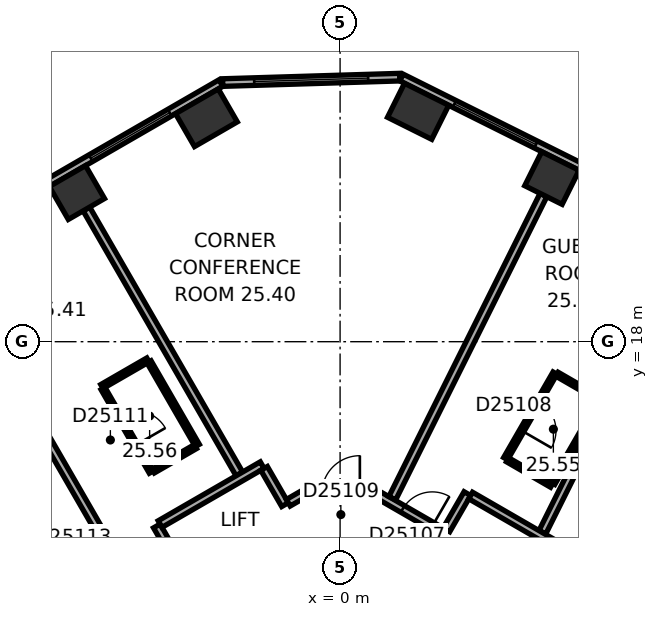
"""IFC4 building model, lengths in metres.
Left out: names, types, materials, properties, quantities, classifications, styles, units other than length and angle.
Written with IfcOpenShell. Run it as: python <this file> out.ifc"""

import sys

from ifc_helpers import new_model, si_unit, direction, frame, frame_2d, origin, origin_2d, place, context, subcontext, project, spatial, rectangle, extrude, element, fill, save


model = new_model("IFC4")
c1 = context("Model", 3, precision=1e-05, world=origin(), true_north=direction((0.0, 1.0)))
c2 = subcontext(c1, "Body", "Model", "MODEL_VIEW")
j1 = project(units=[si_unit("LENGTHUNIT", "METRE"), si_unit("PLANEANGLEUNIT", "RADIAN")], contexts=[c1])
p1 = place(None, origin())
s1 = spatial("IfcSite", under=j1, at=p1, CompositionType="ELEMENT")
p2 = place(p1, origin())
s2 = spatial("IfcBuilding", under=s1, at=p2, CompositionType="ELEMENT")
p3 = place(p2, frame((0.0, 0.0, 106.7)))
s3 = spatial("IfcBuildingStorey", under=s2, at=p3, CompositionType="ELEMENT", Elevation=106.7)
p4 = place(p3, frame((5.574, 22.306, 0.0), z_axis=(0.0, 0.0, 1.0), x_axis=(-0.894934361602, 0.44619781311, 0.0)))
e1 = element("IfcColumn", 1, at=p4, inside=s3, PredefinedType="COLUMN", context=c2, shape_type="SweptSolid", body=[
    extrude(rectangle(XDim=1.1, YDim=1.0, at=origin_2d()), origin(), (0.0, 0.0, 1.0), 3.3),
])
for number, where, z_axis, x_axis in (
    (2, (2.053, 24.062, 0.0), (0.0, 0.0, 1.0), (-0.895, 0.446, 0.0)),
    (3, (-3.518, 23.892, 0.0), (0.0, 0.0, 1.0), (-0.866, -0.5, 0.0)),
):
    element("IfcColumn", number, at=place(p3, frame(where, z_axis=z_axis, x_axis=x_axis)), inside=s3, PredefinedType="COLUMN", context=c2, shape_type="SweptSolid", body=[
        extrude(rectangle(XDim=1.3, YDim=1.0, at=origin_2d()), origin(), (0.0, 0.0, 1.0), 3.3),
    ])
p5 = place(p3, frame((-6.926, 21.925, 0.0), z_axis=(0.0, 0.0, 1.0), x_axis=(-0.866025403784, -0.5, 0.0)))
e4 = element("IfcColumn", 4, at=p5, inside=s3, PredefinedType="COLUMN", context=c2, shape_type="SweptSolid", body=[
    extrude(rectangle(XDim=1.1, YDim=1.0, at=origin_2d()), origin(), (0.0, 0.0, 1.0), 3.3),
])
p6 = place(p3, frame((20.63, 15.47, 0.0), z_axis=(0.0, 0.0, 1.0), x_axis=(-0.894934518609, 0.446197498203, 0.0)))
e5 = element("IfcWall", 5, at=p6, inside=s3, PredefinedType="STANDARD", context=c2, shape_type="SweptSolid", body=[
    extrude(rectangle(XDim=21.246, YDim=0.2, at=frame_2d((10.623, 0.0))), origin(), (0.0, 0.0, 1.0), 3.3),
])
p7 = place(p6, frame((1.553, 0.0, 0.8)))
e6 = element("IfcOpeningElement", 6, at=p7, cuts=e5, PredefinedType="OPENING", context=c2, shape_type="SweptSolid", body=[
    extrude(rectangle(XDim=2.4, YDim=1.7, at=frame_2d((1.2, 0.85))), frame((0.0, 0.11, 0.0), z_axis=(0.0, -1.0, 0.0), x_axis=(1.0, 0.0, 0.0)), (0.0, 0.0, 1.0), 0.22),
])
p8 = place(p6, frame((5.488, 0.0, 0.8)))
e7 = element("IfcOpeningElement", 7, at=p8, cuts=e5, PredefinedType="OPENING", context=c2, shape_type="SweptSolid", body=[
    extrude(rectangle(XDim=2.4, YDim=1.7, at=frame_2d((1.2, 0.85))), frame((0.0, 0.11, 0.0), z_axis=(0.0, -1.0, 0.0), x_axis=(1.0, 0.0, 0.0)), (0.0, 0.0, 1.0), 0.22),
])
p9 = place(p6, frame((9.422, 0.0, 0.8)))
e8 = element("IfcOpeningElement", 8, at=p9, cuts=e5, PredefinedType="OPENING", context=c2, shape_type="SweptSolid", body=[
    extrude(rectangle(XDim=2.4, YDim=1.7, at=frame_2d((1.2, 0.85))), frame((0.0, 0.11, 0.0), z_axis=(0.0, -1.0, 0.0), x_axis=(1.0, 0.0, 0.0)), (0.0, 0.0, 1.0), 0.22),
])
p10 = place(p6, frame((13.357, 0.0, 0.8)))
e9 = element("IfcOpeningElement", 9, at=p10, cuts=e5, PredefinedType="OPENING", context=c2, shape_type="SweptSolid", body=[
    extrude(rectangle(XDim=2.4, YDim=1.7, at=frame_2d((1.2, 0.85))), frame((0.0, 0.11, 0.0), z_axis=(0.0, -1.0, 0.0), x_axis=(1.0, 0.0, 0.0)), (0.0, 0.0, 1.0), 0.22),
])
p11 = place(p6, frame((17.292, 0.0, 0.8)))
e10 = element("IfcOpeningElement", 10, at=p11, cuts=e5, PredefinedType="OPENING", context=c2, shape_type="SweptSolid", body=[
    extrude(rectangle(XDim=2.4, YDim=1.7, at=frame_2d((1.2, 0.85))), frame((0.0, 0.11, 0.0), z_axis=(0.0, -1.0, 0.0), x_axis=(1.0, 0.0, 0.0)), (0.0, 0.0, 1.0), 0.22),
])
p12 = place(p3, frame((1.568, 24.961, 0.0), z_axis=(0.0, 0.0, 1.0), x_axis=(-0.999533359013, -0.030546099927, 0.0)))
e11 = element("IfcWall", 11, at=p12, inside=s3, PredefinedType="STANDARD", context=c2, shape_type="SweptSolid", body=[
    extrude(rectangle(XDim=4.66, YDim=0.2, at=frame_2d((2.33, 0.0))), origin(), (0.0, 0.0, 1.0), 3.3),
])
p13 = place(p12, frame((0.83, 0.0, 0.8)))
e12 = element("IfcOpeningElement", 12, at=p13, cuts=e11, PredefinedType="OPENING", context=c2, shape_type="SweptSolid", body=[
    extrude(rectangle(XDim=3.0, YDim=1.7, at=frame_2d((1.5, 0.85))), frame((0.0, 0.11, 0.0), z_axis=(0.0, -1.0, 0.0), x_axis=(1.0, 0.0, 0.0)), (0.0, 0.0, 1.0), 0.22),
])
p14 = place(p3, frame((-3.136, 24.805, 0.0), z_axis=(0.0, 0.0, 1.0), x_axis=(-0.866028291626, -0.499994998079, 0.0)))
e13 = element("IfcWall", 13, at=p14, inside=s3, PredefinedType="STANDARD", context=c2, shape_type="SweptSolid", body=[
    extrude(rectangle(XDim=21.246, YDim=0.2, at=frame_2d((10.623, 0.0))), origin(), (0.0, 0.0, 1.0), 3.3),
])
p15 = place(p14, frame((1.555, 0.0, 0.8)))
e14 = element("IfcOpeningElement", 14, at=p15, cuts=e13, PredefinedType="OPENING", context=c2, shape_type="SweptSolid", body=[
    extrude(rectangle(XDim=2.4, YDim=1.7, at=frame_2d((1.2, 0.85))), frame((0.0, 0.11, 0.0), z_axis=(0.0, -1.0, 0.0), x_axis=(1.0, 0.0, 0.0)), (0.0, 0.0, 1.0), 0.22),
])
p16 = place(p14, frame((5.489, 0.0, 0.8)))
e15 = element("IfcOpeningElement", 15, at=p16, cuts=e13, PredefinedType="OPENING", context=c2, shape_type="SweptSolid", body=[
    extrude(rectangle(XDim=2.4, YDim=1.7, at=frame_2d((1.2, 0.85))), frame((0.0, 0.11, 0.0), z_axis=(0.0, -1.0, 0.0), x_axis=(1.0, 0.0, 0.0)), (0.0, 0.0, 1.0), 0.22),
])
p17 = place(p14, frame((9.424, 0.0, 0.8)))
e16 = element("IfcOpeningElement", 16, at=p17, cuts=e13, PredefinedType="OPENING", context=c2, shape_type="SweptSolid", body=[
    extrude(rectangle(XDim=2.4, YDim=1.7, at=frame_2d((1.2, 0.85))), frame((0.0, 0.11, 0.0), z_axis=(0.0, -1.0, 0.0), x_axis=(1.0, 0.0, 0.0)), (0.0, 0.0, 1.0), 0.22),
])
p18 = place(p14, frame((13.358, 0.0, 0.8)))
e17 = element("IfcOpeningElement", 17, at=p18, cuts=e13, PredefinedType="OPENING", context=c2, shape_type="SweptSolid", body=[
    extrude(rectangle(XDim=2.4, YDim=1.7, at=frame_2d((1.2, 0.85))), frame((0.0, 0.11, 0.0), z_axis=(0.0, -1.0, 0.0), x_axis=(1.0, 0.0, 0.0)), (0.0, 0.0, 1.0), 0.22),
])
p19 = place(p14, frame((17.293, 0.0, 0.8)))
e18 = element("IfcOpeningElement", 18, at=p19, cuts=e13, PredefinedType="OPENING", context=c2, shape_type="SweptSolid", body=[
    extrude(rectangle(XDim=2.4, YDim=1.7, at=frame_2d((1.2, 0.85))), frame((0.0, 0.11, 0.0), z_axis=(0.0, -1.0, 0.0), x_axis=(1.0, 0.0, 0.0)), (0.0, 0.0, 1.0), 0.22),
])
p20 = place(p3, frame((-10.083, 19.524, 0.0), z_axis=(0.0, 0.0, 1.0), x_axis=(0.499999662836, -0.866025598446, 0.0)))
e19 = element("IfcWall", 19, at=p20, inside=s3, PredefinedType="PARTITIONING", context=c2, shape_type="SweptSolid", body=[
    extrude(rectangle(XDim=9.25, YDim=0.2, at=frame_2d((4.625, 0.0))), origin(), (0.0, 0.0, 1.0), 2.6),
])
p21 = place(p3, frame((-8.177, 13.223, 0.0), z_axis=(0.0, 0.0, 1.0), x_axis=(0.500087089641, -0.865975116718, 0.0)))
e20 = element("IfcWall", 20, at=p21, inside=s3, PredefinedType="PARTITIONING", context=c2, shape_type="SweptSolid", body=[
    extrude(rectangle(XDim=2.84, YDim=0.12, at=frame_2d((1.42, 0.0))), origin(), (0.0, 0.0, 1.0), 3.05),
])
p22 = place(p21, frame((0.97, 0.0, 0.0)))
e21 = element("IfcOpeningElement", 21, at=p22, cuts=e20, PredefinedType="OPENING", context=c2, shape_type="SweptSolid", body=[
    extrude(rectangle(XDim=0.9, YDim=2.1, at=frame_2d((0.45, 1.05))), frame((0.0, 0.07, 0.0), z_axis=(0.0, -1.0, 0.0), x_axis=(1.0, 0.0, 0.0)), (0.0, 0.0, 1.0), 0.14),
])
p23 = place(p3, frame((-6.676, 21.492, 0.0), z_axis=(0.0, 0.0, 1.0), x_axis=(0.500011263043, -0.866018900966, 0.0)))
e22 = element("IfcWall", 22, at=p23, inside=s3, PredefinedType="PARTITIONING", context=c2, shape_type="SweptSolid", body=[
    extrude(rectangle(XDim=8.049, YDim=0.2, at=frame_2d((4.024, 0.0))), origin(), (0.0, 0.0, 1.0), 3.05),
])
p24 = place(p3, frame((-6.268, 16.82, 0.0), z_axis=(0.0, 0.0, 1.0), x_axis=(0.866002662425, 0.500039387122, 0.0)))
e23 = element("IfcWall", 23, at=p24, inside=s3, PredefinedType="PARTITIONING", context=c2, shape_type="SweptSolid", body=[
    extrude(rectangle(XDim=1.4, YDim=0.12, at=frame_2d((0.7, 0.0))), origin(), (0.0, 0.0, 1.0), 3.05),
])
p25 = place(p3, frame((-5.026, 17.469, 0.0), z_axis=(0.0, 0.0, 1.0), x_axis=(0.500005339912, -0.866022320763, 0.0)))
e24 = element("IfcWall", 24, at=p25, inside=s3, PredefinedType="PARTITIONING", context=c2, shape_type="SweptSolid", body=[
    extrude(rectangle(XDim=2.54, YDim=0.12, at=frame_2d((1.27, 0.0))), origin(), (0.0, 0.0, 1.0), 3.05),
])
p26 = place(p3, frame((-4.968, 14.569, 0.0), z_axis=(0.0, 0.0, 1.0), x_axis=(-0.500046963369, 0.865998287773, 0.0)))
e25 = element("IfcWall", 25, at=p26, inside=s3, PredefinedType="PARTITIONING", context=c2, shape_type="SweptSolid", body=[
    extrude(rectangle(XDim=2.54, YDim=0.12, at=frame_2d((1.27, 0.0))), origin(), (0.0, 0.0, 1.0), 3.05),
])
p27 = place(p26, frame((0.82, 0.0, 0.0)))
e26 = element("IfcOpeningElement", 26, at=p27, cuts=e25, PredefinedType="OPENING", context=c2, shape_type="SweptSolid", body=[
    extrude(rectangle(XDim=0.9, YDim=2.1, at=frame_2d((0.45, 1.05))), frame((0.0, 0.07, 0.0), z_axis=(0.0, -1.0, 0.0), x_axis=(1.0, 0.0, 0.0)), (0.0, 0.0, 1.0), 0.14),
])
p28 = place(p3, frame((-4.823, 13.152, 0.0), z_axis=(0.0, 0.0, 1.0), x_axis=(0.499986357472, -0.866033280158, 0.0)))
e27 = element("IfcWall", 27, at=p28, inside=s3, PredefinedType="PARTITIONING", context=c2, shape_type="SweptSolid", body=[
    extrude(rectangle(XDim=1.201, YDim=0.2, at=frame_2d((0.601, 0.0))), origin(), (0.0, 0.0, 1.0), 3.05),
])
p29 = place(p3, frame((-3.808, 15.239, 0.0), z_axis=(0.0, 0.0, 1.0), x_axis=(-0.866087136806, -0.499893060024, 0.0)))
e28 = element("IfcWall", 28, at=p29, inside=s3, PredefinedType="PARTITIONING", context=c2, shape_type="SweptSolid", body=[
    extrude(rectangle(XDim=1.28, YDim=0.12, at=frame_2d((0.64, 0.0))), origin(), (0.0, 0.0, 1.0), 3.05),
])
p30 = place(p3, frame((-2.05, 14.752, 0.0), z_axis=(0.0, 0.0, 1.0), x_axis=(-0.866030936828, -0.499990416364, 0.0)))
e29 = element("IfcWall", 29, at=p30, inside=s3, PredefinedType="PARTITIONING", context=c2, shape_type="SweptSolid", body=[
    extrude(rectangle(XDim=3.102, YDim=0.2, at=frame_2d((1.551, 0.0))), origin(), (0.0, 0.0, 1.0), 3.05),
])
p31 = place(p3, frame((-1.449, 13.712, 0.0), z_axis=(0.0, 0.0, 1.0), x_axis=(-0.499978356969, 0.866037899034, 0.0)))
e30 = element("IfcWall", 30, at=p31, inside=s3, PredefinedType="PARTITIONING", context=c2, shape_type="SweptSolid", body=[
    extrude(rectangle(XDim=1.101, YDim=0.2, at=frame_2d((0.551, 0.0))), origin(), (0.0, 0.0, 1.0), 3.05),
])
p32 = place(p3, frame((-0.95, 14.001, 0.0), z_axis=(0.0, 0.0, 1.0), x_axis=(-0.86609177584, -0.499885022602, 0.0)))
e31 = element("IfcWall", 31, at=p32, inside=s3, PredefinedType="PARTITIONING", context=c2, shape_type="SweptSolid", body=[
    extrude(rectangle(XDim=0.477, YDim=0.2, at=frame_2d((0.238, 0.0))), origin(), (0.0, 0.0, 1.0), 3.05),
])
p33 = place(p3, frame((0.95, 14.001, 0.0), z_axis=(0.0, 0.0, 1.0), x_axis=(-1.0, 0.0, 0.0)))
e32 = element("IfcWall", 32, at=p33, inside=s3, PredefinedType="PARTITIONING", context=c2, shape_type="SweptSolid", body=[
    extrude(rectangle(XDim=1.86, YDim=0.2, at=frame_2d((0.93, 0.0))), origin(), (0.0, 0.0, 1.0), 3.05),
])
p34 = place(p33, frame((0.43, 0.0, 0.0)))
e33 = element("IfcOpeningElement", 33, at=p34, cuts=e32, PredefinedType="OPENING", context=c2, shape_type="SweptSolid", body=[
    extrude(rectangle(XDim=1.0, YDim=2.1, at=frame_2d((0.5, 1.05))), frame((0.0, 0.11, 0.0), z_axis=(0.0, -1.0, 0.0), x_axis=(1.0, 0.0, 0.0)), (0.0, 0.0, 1.0), 0.22),
])
p35 = place(p3, frame((2.748, 12.962, 0.0), z_axis=(0.0, 0.0, 1.0), x_axis=(-0.866013897511, 0.50001992892, 0.0)))
e34 = element("IfcWall", 34, at=p35, inside=s3, PredefinedType="PARTITIONING", context=c2, shape_type="SweptSolid", body=[
    extrude(rectangle(XDim=2.037, YDim=0.2, at=frame_2d((1.018, 0.0))), origin(), (0.0, 0.0, 1.0), 3.05),
])
p36 = place(p35, frame((0.372, 0.0, 0.0)))
e35 = element("IfcOpeningElement", 35, at=p36, cuts=e34, PredefinedType="OPENING", context=c2, shape_type="SweptSolid", body=[
    extrude(rectangle(XDim=0.9, YDim=2.1, at=frame_2d((0.45, 1.05))), frame((0.0, 0.11, 0.0), z_axis=(0.0, -1.0, 0.0), x_axis=(1.0, 0.0, 0.0)), (0.0, 0.0, 1.0), 0.22),
])
p37 = place(p3, frame((3.349, 14.002, 0.0), z_axis=(0.0, 0.0, 1.0), x_axis=(-0.500074377092, -0.865982457891, 0.0)))
e36 = element("IfcWall", 36, at=p37, inside=s3, PredefinedType="PARTITIONING", context=c2, shape_type="SweptSolid", body=[
    extrude(rectangle(XDim=1.101, YDim=0.2, at=frame_2d((0.55, 0.0))), origin(), (0.0, 0.0, 1.0), 3.05),
])
p38 = place(p3, frame((4.356, 14.922, 0.0), z_axis=(0.0, 0.0, 1.0), x_axis=(0.499936506574, 0.866062058628, 0.0)))
e37 = element("IfcWall", 37, at=p38, inside=s3, PredefinedType="PARTITIONING", context=c2, shape_type="SweptSolid", body=[
    extrude(rectangle(XDim=2.6, YDim=0.12, at=frame_2d((1.3, 0.0))), origin(), (0.0, 0.0, 1.0), 3.05),
])
p39 = place(p38, frame((0.85, 0.0, 0.0)))
e38 = element("IfcOpeningElement", 38, at=p39, cuts=e37, PredefinedType="OPENING", context=c2, shape_type="SweptSolid", body=[
    extrude(rectangle(XDim=0.9, YDim=2.1, at=frame_2d((0.45, 1.05))), frame((0.0, 0.07, 0.0), z_axis=(0.0, -1.0, 0.0), x_axis=(1.0, 0.0, 0.0)), (0.0, 0.0, 1.0), 0.14),
])
p40 = place(p3, frame((5.351, 21.859, 0.0), z_axis=(0.0, 0.0, 1.0), x_axis=(-0.446205309328, -0.894930624086, 0.0)))
e39 = element("IfcWall", 39, at=p40, inside=s3, PredefinedType="PARTITIONING", context=c2, shape_type="SweptSolid", body=[
    extrude(rectangle(XDim=8.913, YDim=0.2, at=frame_2d((4.457, 0.0))), origin(), (0.0, 0.0, 1.0), 2.6),
])
p41 = place(p3, frame((5.569, 14.222, 0.0), z_axis=(0.0, 0.0, 1.0), x_axis=(-0.866036909293, 0.499980071345, 0.0)))
e40 = element("IfcWall", 40, at=p41, inside=s3, PredefinedType="PARTITIONING", context=c2, shape_type="SweptSolid", body=[
    extrude(rectangle(XDim=1.34, YDim=0.12, at=frame_2d((0.67, 0.0))), origin(), (0.0, 0.0, 1.0), 3.05),
])
p42 = place(p3, frame((5.708, 17.144, 0.0), z_axis=(0.0, 0.0, 1.0), x_axis=(0.866082447003, -0.499901185229, 0.0)))
e41 = element("IfcWall", 41, at=p42, inside=s3, PredefinedType="PARTITIONING", context=c2, shape_type="SweptSolid", body=[
    extrude(rectangle(XDim=1.34, YDim=0.12, at=frame_2d((0.67, 0.0))), origin(), (0.0, 0.0, 1.0), 3.05),
])
p43 = place(p3, frame((6.839, 16.422, 0.0), z_axis=(0.0, 0.0, 1.0), x_axis=(-0.50000366821, -0.866023285932, 0.0)))
e42 = element("IfcWall", 42, at=p43, inside=s3, PredefinedType="PARTITIONING", context=c2, shape_type="SweptSolid", body=[
    extrude(rectangle(XDim=2.48, YDim=0.12, at=frame_2d((1.24, 0.0))), origin(), (0.0, 0.0, 1.0), 3.05),
])
p44 = place(p3, frame((8.872, 20.104, 0.0), z_axis=(0.0, 0.0, 1.0), x_axis=(-0.446218378653, -0.894924107706, 0.0)))
e43 = element("IfcWall", 43, at=p44, inside=s3, PredefinedType="PARTITIONING", context=c2, shape_type="SweptSolid", body=[
    extrude(rectangle(XDim=7.95, YDim=0.2, at=frame_2d((3.975, 0.0))), origin(), (0.0, 0.0, 1.0), 3.05),
])
p45 = place(p3, frame((10.885, 9.652, 0.0), z_axis=(0.0, 0.0, 1.0), x_axis=(-0.866033868542, 0.499985338323, 0.0)))
e44 = element("IfcWall", 44, at=p45, inside=s3, PredefinedType="PARTITIONING", context=c2, shape_type="SweptSolid", body=[
    extrude(rectangle(XDim=8.602, YDim=0.2, at=frame_2d((4.301, 0.0))), origin(), (0.0, 0.0, 1.0), 3.05),
])
p46 = place(p45, frame((2.739, 0.0, 0.0)))
e45 = element("IfcOpeningElement", 45, at=p46, cuts=e44, PredefinedType="OPENING", context=c2, shape_type="SweptSolid", body=[
    extrude(rectangle(XDim=1.0, YDim=2.1, at=frame_2d((0.5, 1.05))), frame((0.0, 0.11, 0.0), z_axis=(0.0, -1.0, 0.0), x_axis=(1.0, 0.0, 0.0)), (0.0, 0.0, 1.0), 0.22),
])
p47 = place(p11, origin())
e46 = element("IfcWindow", 46, at=p47, inside=s3, PartitioningType="SINGLE_PANEL", PredefinedType="WINDOW", context=c2, shape_type="SweptSolid", body=[
    extrude(rectangle(XDim=2.4, YDim=1.7, at=frame_2d((1.2, 0.85))), frame((0.0, 0.03, 0.0), z_axis=(0.0, -1.0, 0.0), x_axis=(1.0, 0.0, 0.0)), (0.0, 0.0, 1.0), 0.06),
])
fill(e10, e46)
p48 = place(p13, origin())
e47 = element("IfcWindow", 47, at=p48, inside=s3, PartitioningType="SINGLE_PANEL", PredefinedType="WINDOW", context=c2, shape_type="SweptSolid", body=[
    extrude(rectangle(XDim=3.0, YDim=1.7, at=frame_2d((1.5, 0.85))), frame((0.0, 0.03, 0.0), z_axis=(0.0, -1.0, 0.0), x_axis=(1.0, 0.0, 0.0)), (0.0, 0.0, 1.0), 0.06),
])
fill(e12, e47)
p49 = place(p15, origin())
e48 = element("IfcWindow", 48, at=p49, inside=s3, PartitioningType="SINGLE_PANEL", PredefinedType="WINDOW", context=c2, shape_type="SweptSolid", body=[
    extrude(rectangle(XDim=2.4, YDim=1.7, at=frame_2d((1.2, 0.85))), frame((0.0, 0.03, 0.0), z_axis=(0.0, -1.0, 0.0), x_axis=(1.0, 0.0, 0.0)), (0.0, 0.0, 1.0), 0.06),
])
fill(e14, e48)
p50 = place(p36, origin())
e49 = element("IfcDoor", 49, at=p50, inside=s3, OperationType="SINGLE_SWING_LEFT", PredefinedType="DOOR", context=c2, shape_type="SweptSolid", body=[
    extrude(rectangle(XDim=0.9, YDim=2.1, at=frame_2d((0.45, 1.05))), frame((0.0, 0.025, 0.0), z_axis=(0.0, -1.0, 0.0), x_axis=(1.0, 0.0, 0.0)), (0.0, 0.0, 1.0), 0.05),
])
fill(e35, e49)
p51 = place(p39, origin())
e50 = element("IfcDoor", 50, at=p51, inside=s3, OperationType="SINGLE_SWING_LEFT", PredefinedType="DOOR", context=c2, shape_type="SweptSolid", body=[
    extrude(rectangle(XDim=0.9, YDim=2.1, at=frame_2d((0.45, 1.05))), frame((0.0, 0.025, 0.0), z_axis=(0.0, -1.0, 0.0), x_axis=(1.0, 0.0, 0.0)), (0.0, 0.0, 1.0), 0.05),
])
fill(e38, e50)
p52 = place(p34, origin())
e51 = element("IfcDoor", 51, at=p52, inside=s3, OperationType="SINGLE_SWING_LEFT", PredefinedType="DOOR", context=c2, shape_type="SweptSolid", body=[
    extrude(rectangle(XDim=1.0, YDim=2.1, at=frame_2d((0.5, 1.05))), frame((0.0, 0.025, 0.0), z_axis=(0.0, -1.0, 0.0), x_axis=(1.0, 0.0, 0.0)), (0.0, 0.0, 1.0), 0.05),
])
fill(e33, e51)
p53 = place(p27, origin())
e52 = element("IfcDoor", 52, at=p53, inside=s3, OperationType="SINGLE_SWING_LEFT", PredefinedType="DOOR", context=c2, shape_type="SweptSolid", body=[
    extrude(rectangle(XDim=0.9, YDim=2.1, at=frame_2d((0.45, 1.05))), frame((0.0, 0.025, 0.0), z_axis=(0.0, -1.0, 0.0), x_axis=(1.0, 0.0, 0.0)), (0.0, 0.0, 1.0), 0.05),
])
fill(e26, e52)
save(model, sys.argv[1])
